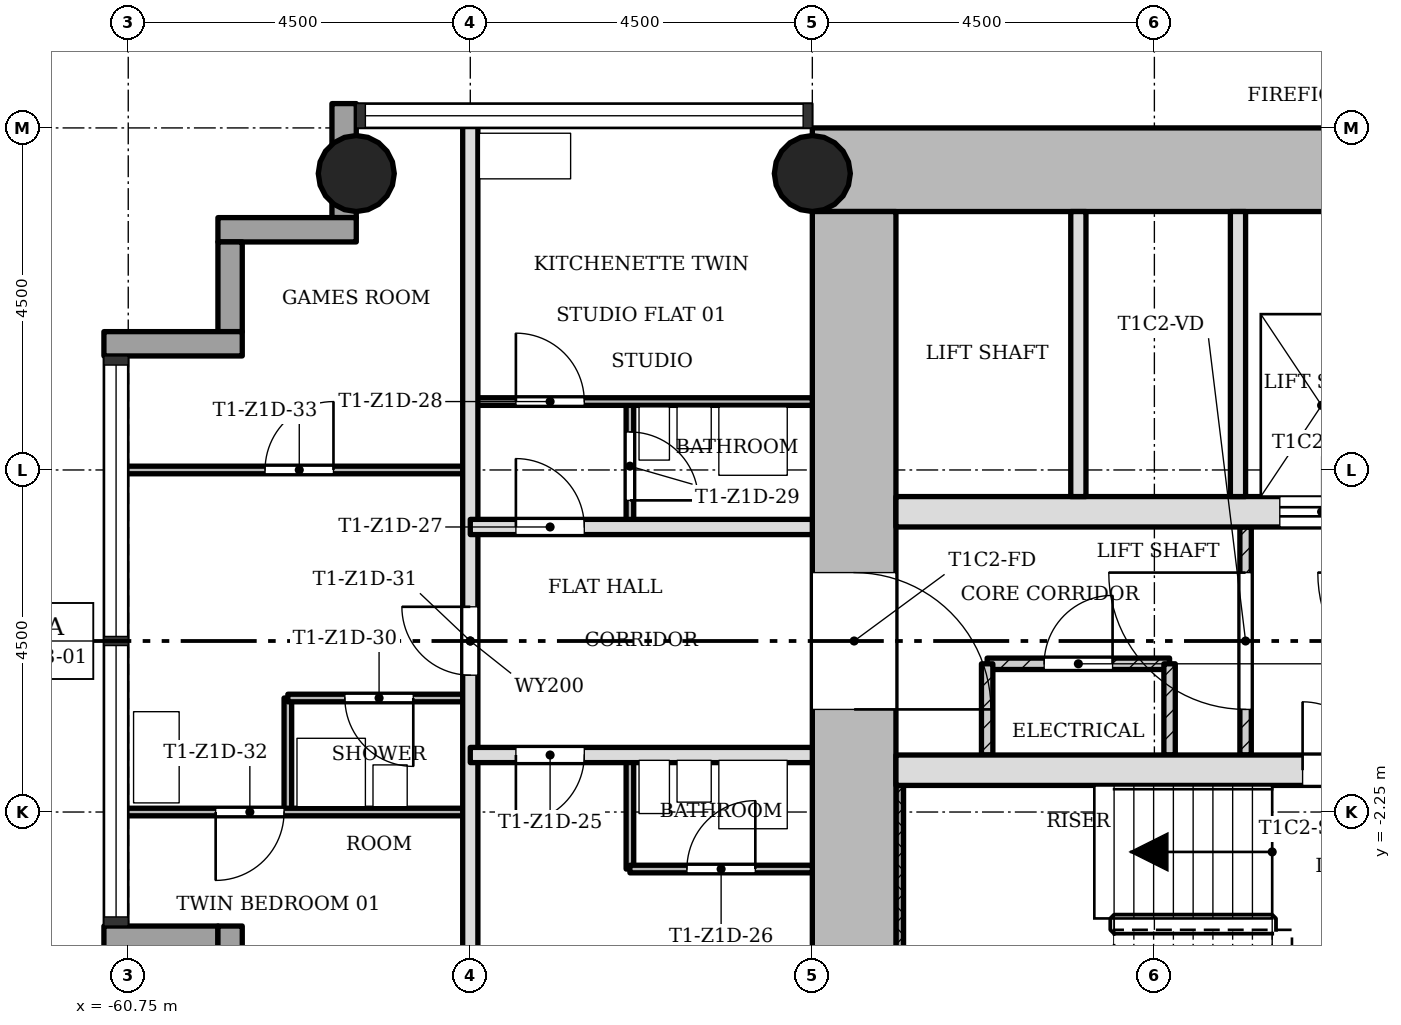
"""IFC4 building model, lengths in metres.
Left out: names, types, materials, properties, quantities, classifications, styles, units other than length and angle.
Written with IfcOpenShell. Run it as: python <this file> out.ifc"""

import sys

from ifc_helpers import new_model, si_unit, direction, frame, frame_2d, origin, origin_2d, place, context, subcontext, project, spatial, rectangle, hollow_circle, extrude, element, fill, save


model = new_model("IFC4")
c1 = context("Model", 3, precision=1e-05, world=origin(), true_north=direction((0.0, 1.0)))
c2 = subcontext(c1, "Body", "Model", "MODEL_VIEW")
j1 = project(units=[si_unit("LENGTHUNIT", "METRE"), si_unit("PLANEANGLEUNIT", "RADIAN")], contexts=[c1])
p1 = place(None, origin())
s1 = spatial("IfcSite", under=j1, at=p1, CompositionType="ELEMENT")
p2 = place(p1, origin())
s2 = spatial("IfcBuilding", under=s1, at=p2, CompositionType="ELEMENT")
p3 = place(p2, frame((0.0, 0.0, 55.1)))
s3 = spatial("IfcBuildingStorey", under=s2, at=p3, CompositionType="ELEMENT", Elevation=55.1)
p4 = place(p3, frame((-43.85, 6.2, 0.0), z_axis=(0.0, 0.0, 1.0), x_axis=(-1.0, 0.0, 0.0)))
e1 = element("IfcWall", 1, at=p4, inside=s3, PredefinedType="SHEAR", context=c2, shape_type="SweptSolid", body=[
    extrude(rectangle(XDim=7.9, YDim=1.1, at=frame_2d((3.95, 0.0))), origin(), (0.0, 0.0, 1.0), 3.4),
])
p5 = place(p3, frame((-51.2, 5.65, 0.0), z_axis=(0.0, 0.0, 1.0), x_axis=(0.0, -1.0, 0.0)))
e2 = element("IfcWall", 2, at=p5, inside=s3, PredefinedType="SHEAR", context=c2, shape_type="SweptSolid", body=[
    extrude(rectangle(XDim=12.4, YDim=1.1, at=frame_2d((6.2, 0.0))), origin(), (0.0, 0.0, 1.0), 3.4),
])
p6 = place(p5, frame((4.75, 0.0, 0.0)))
e3 = element("IfcOpeningElement", 3, at=p6, cuts=e2, PredefinedType="OPENING", context=c2, shape_type="SweptSolid", body=[
    extrude(rectangle(XDim=1.8, YDim=2.1, at=frame_2d((0.9, 1.05))), frame((0.0, 0.56, 0.0), z_axis=(0.0, -1.0, 0.0), x_axis=(1.0, 0.0, 0.0)), (0.0, 0.0, 1.0), 1.12),
])
p7 = place(p3, frame((-50.65, -1.7, 0.0), z_axis=(0.0, 0.0, 1.0), x_axis=(1.0, 0.0, 0.0)))
e4 = element("IfcWall", 4, at=p7, inside=s3, PredefinedType="SHEAR", context=c2, shape_type="SweptSolid", body=[
    extrude(rectangle(XDim=6.8, YDim=0.4, at=frame_2d((3.4, 0.0))), origin(), (0.0, 0.0, 1.0), 3.4),
])
p8 = place(p7, frame((5.35, 0.0, 0.0)))
e5 = element("IfcOpeningElement", 5, at=p8, cuts=e4, PredefinedType="OPENING", context=c2, shape_type="SweptSolid", body=[
    extrude(rectangle(XDim=0.9, YDim=2.1, at=frame_2d((0.45, 1.05))), frame((0.0, 0.21, 0.0), z_axis=(0.0, -1.0, 0.0), x_axis=(1.0, 0.0, 0.0)), (0.0, 0.0, 1.0), 0.42),
])
p9 = place(p3, frame((-50.65, 1.7, 0.0), z_axis=(0.0, 0.0, 1.0), x_axis=(1.0, 0.0, 0.0)))
e6 = element("IfcWall", 6, at=p9, inside=s3, PredefinedType="SHEAR", context=c2, shape_type="SweptSolid", body=[
    extrude(rectangle(XDim=6.8, YDim=0.4, at=frame_2d((3.4, 0.0))), origin(), (0.0, 0.0, 1.0), 3.4),
])
p10 = place(p9, frame((5.05, 0.0, 0.0)))
e7 = element("IfcOpeningElement", 7, at=p10, cuts=e6, PredefinedType="OPENING", context=c2, shape_type="SweptSolid", body=[
    extrude(rectangle(XDim=1.1, YDim=2.1, at=frame_2d((0.55, 1.05))), frame((0.0, 0.21, 0.0), z_axis=(0.0, -1.0, 0.0), x_axis=(1.0, 0.0, 0.0)), (0.0, 0.0, 1.0), 0.42),
])
for number, where, z_axis, x_axis in (
    (8, (-51.75, 6.15, 0.0), (0.0, 0.0, 1.0), (1.0, 0.0, 0.0)),
    (9, (-57.75, 6.15, 0.0), (0.0, 0.0, 1.0), (1.0, 0.0, 0.0)),
):
    element("IfcColumn", number, at=place(p3, frame(where, z_axis=z_axis, x_axis=x_axis)), inside=s3, PredefinedType="COLUMN", context=c2, shape_type="SweptSolid", body=[
        extrude(hollow_circle(Radius=0.5, WallThickness=0.036, at=origin_2d()), origin(), (0.0, 0.0, 1.0), 3.4),
    ])
p11 = place(p3, frame((-61.07, -3.91, -0.3), z_axis=(0.0, 0.0, 1.0), x_axis=(1.0, 0.0, 0.0)))
e10 = element("IfcWall", 10, at=p11, inside=s3, PredefinedType="STANDARD", context=c2, shape_type="SweptSolid", body=[
    extrude(rectangle(XDim=1.5, YDim=0.32, at=frame_2d((0.75, 0.0))), origin(), (0.0, 0.0, 1.0), 3.4),
])
p12 = place(p3, frame((-59.41, -3.75, -0.3), z_axis=(0.0, 0.0, 1.0), x_axis=(0.0, -1.0, 0.0)))
e11 = element("IfcWall", 11, at=p12, inside=s3, PredefinedType="STANDARD", context=c2, shape_type="SweptSolid", body=[
    extrude(rectangle(XDim=1.82, YDim=0.32, at=frame_2d((0.91, 0.0))), origin(), (0.0, 0.0, 1.0), 3.4),
])
p13 = place(p12, frame((0.41, 0.0, 1.2)))
e12 = element("IfcOpeningElement", 12, at=p13, cuts=e11, PredefinedType="OPENING", context=c2, shape_type="SweptSolid", body=[
    extrude(rectangle(XDim=1.0, YDim=1.5, at=frame_2d((0.5, 0.75))), frame((0.0, 0.17, 0.0), z_axis=(0.0, -1.0, 0.0), x_axis=(1.0, 0.0, 0.0)), (0.0, 0.0, 1.0), 0.34),
])
p14 = place(p3, frame((-57.91, 7.07, -0.3), z_axis=(0.0, 0.0, 1.0), x_axis=(0.0, -1.0, 0.0)))
e13 = element("IfcWall", 13, at=p14, inside=s3, PredefinedType="STANDARD", context=c2, shape_type="SweptSolid", body=[
    extrude(rectangle(XDim=1.5, YDim=0.32, at=frame_2d((0.75, 0.0))), origin(), (0.0, 0.0, 1.0), 3.4),
])
p15 = place(p3, frame((-57.75, 5.41, -0.3), z_axis=(0.0, 0.0, 1.0), x_axis=(-1.0, 0.0, 0.0)))
e14 = element("IfcWall", 14, at=p15, inside=s3, PredefinedType="STANDARD", context=c2, shape_type="SweptSolid", body=[
    extrude(rectangle(XDim=1.82, YDim=0.32, at=frame_2d((0.91, 0.0))), origin(), (0.0, 0.0, 1.0), 3.4),
])
p16 = place(p3, frame((-59.41, 5.25, -0.3), z_axis=(0.0, 0.0, 1.0), x_axis=(0.0, -1.0, 0.0)))
e15 = element("IfcWall", 15, at=p16, inside=s3, PredefinedType="STANDARD", context=c2, shape_type="SweptSolid", body=[
    extrude(rectangle(XDim=1.18, YDim=0.32, at=frame_2d((0.59, 0.0))), origin(), (0.0, 0.0, 1.0), 3.4),
])
p17 = place(p3, frame((-59.25, 3.91, -0.3), z_axis=(0.0, 0.0, 1.0), x_axis=(-1.0, 0.0, 0.0)))
e16 = element("IfcWall", 16, at=p17, inside=s3, PredefinedType="STANDARD", context=c2, shape_type="SweptSolid", body=[
    extrude(rectangle(XDim=1.82, YDim=0.32, at=frame_2d((0.91, 0.0))), origin(), (0.0, 0.0, 1.0), 3.4),
])
p18 = place(p3, frame((-46.05, 1.5, 0.0), z_axis=(0.0, 0.0, 1.0), x_axis=(0.0, -1.0, 0.0)))
e17 = element("IfcWall", 17, at=p18, inside=s3, PredefinedType="PARTITIONING", context=c2, shape_type="SweptSolid", body=[
    extrude(rectangle(XDim=3.0, YDim=0.15, at=frame_2d((1.5, 0.0))), origin(), (0.0, 0.0, 1.0), 3.0),
])
p19 = place(p18, frame((0.6, 0.0, 0.0)))
e18 = element("IfcOpeningElement", 18, at=p19, cuts=e17, PredefinedType="OPENING", context=c2, shape_type="SweptSolid", body=[
    extrude(rectangle(XDim=1.8, YDim=2.1, at=frame_2d((0.9, 1.05))), frame((0.0, 0.085, 0.0), z_axis=(0.0, -1.0, 0.0), x_axis=(1.0, 0.0, 0.0)), (0.0, 0.0, 1.0), 0.17),
])
for number, where, z_axis, x_axis in (
    (19, (-46.15, 5.65, 0.0), (0.0, 0.0, 1.0), (0.0, -1.0, 0.0)),
    (20, (-48.25, 5.65, 0.0), (0.0, 0.0, 1.0), (0.0, -1.0, 0.0)),
):
    element("IfcWall", number, at=place(p3, frame(where, z_axis=z_axis, x_axis=x_axis)), inside=s3, PredefinedType="SOLIDWALL", context=c2, shape_type="SweptSolid", body=[
        extrude(rectangle(XDim=3.75, YDim=0.2, at=frame_2d((1.875, 0.0))), origin(), (0.0, 0.0, 1.0), 3.0),
    ])
p20 = place(p3, frame((-47.05, -0.3, 0.0), z_axis=(0.0, 0.0, 1.0), x_axis=(-1.0, 0.0, 0.0)))
e21 = element("IfcWall", 21, at=p20, inside=s3, PredefinedType="PARTITIONING", context=c2, shape_type="SweptSolid", body=[
    extrude(rectangle(XDim=2.4, YDim=0.15, at=frame_2d((1.2, 0.0))), origin(), (0.0, 0.0, 1.0), 3.0),
])
p21 = place(p20, frame((0.75, 0.0, 0.0)))
e22 = element("IfcOpeningElement", 22, at=p21, cuts=e21, PredefinedType="OPENING", context=c2, shape_type="SweptSolid", body=[
    extrude(rectangle(XDim=0.9, YDim=2.1, at=frame_2d((0.45, 1.05))), frame((0.0, 0.085, 0.0), z_axis=(0.0, -1.0, 0.0), x_axis=(1.0, 0.0, 0.0)), (0.0, 0.0, 1.0), 0.17),
])
for number, where, z_axis, x_axis in (
    (23, (-47.05, -0.3, 0.0), (0.0, 0.0, 1.0), (0.0, -1.0, 0.0)),
    (24, (-49.45, -0.3, 0.0), (0.0, 0.0, 1.0), (0.0, -1.0, 0.0)),
):
    element("IfcWall", number, at=place(p3, frame(where, z_axis=z_axis, x_axis=x_axis)), inside=s3, PredefinedType="PARTITIONING", context=c2, shape_type="SweptSolid", body=[
        extrude(rectangle(XDim=1.2, YDim=0.15, at=frame_2d((0.6, 0.0))), origin(), (0.0, 0.0, 1.0), 3.0),
    ])
p22 = place(p3, frame((-58.65, -2.25, 0.0), z_axis=(0.0, 0.0, 1.0), x_axis=(0.0, 1.0, 0.0)))
e25 = element("IfcWall", 25, at=p22, inside=s3, PredefinedType="PARTITIONING", context=c2, shape_type="SweptSolid", body=[
    extrude(rectangle(XDim=1.5, YDim=0.1, at=frame_2d((0.75, 0.0))), origin(), (0.0, 0.0, 1.0), 3.0),
])
p23 = place(p3, frame((-56.25, -6.85, 0.0), z_axis=(0.0, 0.0, 1.0), x_axis=(0.0, 1.0, 0.0)))
e26 = element("IfcWall", 26, at=p23, inside=s3, PredefinedType="SOLIDWALL", context=c2, shape_type="SweptSolid", body=[
    extrude(rectangle(XDim=13.7, YDim=0.2, at=frame_2d((6.85, 0.0))), origin(), (0.0, 0.0, 1.0), 3.0),
])
p24 = place(p23, frame((6.4, 0.0, 0.0)))
e27 = element("IfcOpeningElement", 27, at=p24, cuts=e26, PredefinedType="OPENING", context=c2, shape_type="SweptSolid", body=[
    extrude(rectangle(XDim=0.9, YDim=2.1, at=frame_2d((0.45, 1.05))), frame((0.0, 0.11, 0.0), z_axis=(0.0, -1.0, 0.0), x_axis=(1.0, 0.0, 0.0)), (0.0, 0.0, 1.0), 0.22),
])
p25 = place(p3, frame((-54.15, -3.0, 0.0), z_axis=(0.0, 0.0, 1.0), x_axis=(0.0, 1.0, 0.0)))
e28 = element("IfcWall", 28, at=p25, inside=s3, PredefinedType="PARTITIONING", context=c2, shape_type="SweptSolid", body=[
    extrude(rectangle(XDim=1.5, YDim=0.1, at=frame_2d((0.75, 0.0))), origin(), (0.0, 0.0, 1.0), 3.0),
])
p26 = place(p3, frame((-54.15, 1.5, 0.0), z_axis=(0.0, 0.0, 1.0), x_axis=(0.0, 1.0, 0.0)))
e29 = element("IfcWall", 29, at=p26, inside=s3, PredefinedType="PARTITIONING", context=c2, shape_type="SweptSolid", body=[
    extrude(rectangle(XDim=1.65, YDim=0.1, at=frame_2d((0.825, 0.0))), origin(), (0.0, 0.0, 1.0), 3.0),
])
p27 = place(p26, frame((0.35, 0.0, 0.0)))
e30 = element("IfcOpeningElement", 30, at=p27, cuts=e29, PredefinedType="OPENING", context=c2, shape_type="SweptSolid", body=[
    extrude(rectangle(XDim=0.9, YDim=2.1, at=frame_2d((0.45, 1.05))), frame((0.0, 0.06, 0.0), z_axis=(0.0, -1.0, 0.0), x_axis=(1.0, 0.0, 0.0)), (0.0, 0.0, 1.0), 0.12),
])
p28 = place(p3, frame((-54.15, -3.0, 0.0), z_axis=(0.0, 0.0, 1.0), x_axis=(1.0, 0.0, 0.0)))
e31 = element("IfcWall", 31, at=p28, inside=s3, PredefinedType="PARTITIONING", context=c2, shape_type="SweptSolid", body=[
    extrude(rectangle(XDim=2.4, YDim=0.1, at=frame_2d((1.2, 0.0))), origin(), (0.0, 0.0, 1.0), 3.0),
])
p29 = place(p28, frame((0.75, 0.0, 0.0)))
e32 = element("IfcOpeningElement", 32, at=p29, cuts=e31, PredefinedType="OPENING", context=c2, shape_type="SweptSolid", body=[
    extrude(rectangle(XDim=0.9, YDim=2.1, at=frame_2d((0.45, 1.05))), frame((0.0, 0.06, 0.0), z_axis=(0.0, -1.0, 0.0), x_axis=(1.0, 0.0, 0.0)), (0.0, 0.0, 1.0), 0.12),
])
p30 = place(p3, frame((-60.85, -2.25, 0.0), z_axis=(0.0, 0.0, 1.0), x_axis=(1.0, 0.0, 0.0)))
e33 = element("IfcWall", 33, at=p30, inside=s3, PredefinedType="PARTITIONING", context=c2, shape_type="SweptSolid", body=[
    extrude(rectangle(XDim=4.6, YDim=0.1, at=frame_2d((2.3, 0.0))), origin(), (0.0, 0.0, 1.0), 3.0),
])
p31 = place(p30, frame((1.25, 0.0, 0.0)))
e34 = element("IfcOpeningElement", 34, at=p31, cuts=e33, PredefinedType="OPENING", context=c2, shape_type="SweptSolid", body=[
    extrude(rectangle(XDim=0.9, YDim=2.1, at=frame_2d((0.45, 1.05))), frame((0.0, 0.06, 0.0), z_axis=(0.0, -1.0, 0.0), x_axis=(1.0, 0.0, 0.0)), (0.0, 0.0, 1.0), 0.12),
])
p32 = place(p3, frame((-56.25, -1.5, 0.0), z_axis=(0.0, 0.0, 1.0), x_axis=(1.0, 0.0, 0.0)))
e35 = element("IfcWall", 35, at=p32, inside=s3, PredefinedType="SOLIDWALL", context=c2, shape_type="SweptSolid", body=[
    extrude(rectangle(XDim=4.5, YDim=0.2, at=frame_2d((2.25, 0.0))), origin(), (0.0, 0.0, 1.0), 3.0),
])
p33 = place(p32, frame((0.6, 0.0, 0.0)))
e36 = element("IfcOpeningElement", 36, at=p33, cuts=e35, PredefinedType="OPENING", context=c2, shape_type="SweptSolid", body=[
    extrude(rectangle(XDim=0.9, YDim=2.1, at=frame_2d((0.45, 1.05))), frame((0.0, 0.11, 0.0), z_axis=(0.0, -1.0, 0.0), x_axis=(1.0, 0.0, 0.0)), (0.0, 0.0, 1.0), 0.22),
])
p34 = place(p3, frame((-58.65, -0.75, 0.0), z_axis=(0.0, 0.0, 1.0), x_axis=(1.0, 0.0, 0.0)))
e37 = element("IfcWall", 37, at=p34, inside=s3, PredefinedType="PARTITIONING", context=c2, shape_type="SweptSolid", body=[
    extrude(rectangle(XDim=2.4, YDim=0.1, at=frame_2d((1.2, 0.0))), origin(), (0.0, 0.0, 1.0), 3.0),
])
p35 = place(p34, frame((0.75, 0.0, 0.0)))
e38 = element("IfcOpeningElement", 38, at=p35, cuts=e37, PredefinedType="OPENING", context=c2, shape_type="SweptSolid", body=[
    extrude(rectangle(XDim=0.9, YDim=2.1, at=frame_2d((0.45, 1.05))), frame((0.0, 0.06, 0.0), z_axis=(0.0, -1.0, 0.0), x_axis=(1.0, 0.0, 0.0)), (0.0, 0.0, 1.0), 0.12),
])
p36 = place(p3, frame((-56.25, 1.5, 0.0), z_axis=(0.0, 0.0, 1.0), x_axis=(1.0, 0.0, 0.0)))
e39 = element("IfcWall", 39, at=p36, inside=s3, PredefinedType="SOLIDWALL", context=c2, shape_type="SweptSolid", body=[
    extrude(rectangle(XDim=4.5, YDim=0.2, at=frame_2d((2.25, 0.0))), origin(), (0.0, 0.0, 1.0), 3.0),
])
p37 = place(p36, frame((0.6, 0.0, 0.0)))
e40 = element("IfcOpeningElement", 40, at=p37, cuts=e39, PredefinedType="OPENING", context=c2, shape_type="SweptSolid", body=[
    extrude(rectangle(XDim=0.9, YDim=2.1, at=frame_2d((0.45, 1.05))), frame((0.0, 0.11, 0.0), z_axis=(0.0, -1.0, 0.0), x_axis=(1.0, 0.0, 0.0)), (0.0, 0.0, 1.0), 0.22),
])
p38 = place(p3, frame((-60.85, 2.25, 0.0), z_axis=(0.0, 0.0, 1.0), x_axis=(1.0, 0.0, 0.0)))
e41 = element("IfcWall", 41, at=p38, inside=s3, PredefinedType="PARTITIONING", context=c2, shape_type="SweptSolid", body=[
    extrude(rectangle(XDim=4.6, YDim=0.1, at=frame_2d((2.3, 0.0))), origin(), (0.0, 0.0, 1.0), 3.0),
])
p39 = place(p38, frame((1.9, 0.0, 0.0)))
e42 = element("IfcOpeningElement", 42, at=p39, cuts=e41, PredefinedType="OPENING", context=c2, shape_type="SweptSolid", body=[
    extrude(rectangle(XDim=0.9, YDim=2.1, at=frame_2d((0.45, 1.05))), frame((0.0, 0.06, 0.0), z_axis=(0.0, -1.0, 0.0), x_axis=(1.0, 0.0, 0.0)), (0.0, 0.0, 1.0), 0.12),
])
p40 = place(p3, frame((-56.25, 3.15, 0.0), z_axis=(0.0, 0.0, 1.0), x_axis=(1.0, 0.0, 0.0)))
e43 = element("IfcWall", 43, at=p40, inside=s3, PredefinedType="PARTITIONING", context=c2, shape_type="SweptSolid", body=[
    extrude(rectangle(XDim=4.5, YDim=0.1, at=frame_2d((2.25, 0.0))), origin(), (0.0, 0.0, 1.0), 3.0),
])
p41 = place(p40, frame((0.6, 0.0, 0.0)))
e44 = element("IfcOpeningElement", 44, at=p41, cuts=e43, PredefinedType="OPENING", context=c2, shape_type="SweptSolid", body=[
    extrude(rectangle(XDim=0.9, YDim=2.1, at=frame_2d((0.45, 1.05))), frame((0.0, 0.06, 0.0), z_axis=(0.0, -1.0, 0.0), x_axis=(1.0, 0.0, 0.0)), (0.0, 0.0, 1.0), 0.12),
])
p42 = place(p3, frame((-50.6, -1.9, 0.0), z_axis=(0.0, 0.0, 1.0), x_axis=(0.0, -1.0, 0.0)))
e45 = element("IfcWall", 45, at=p42, inside=s3, PredefinedType="SHEAR", context=c2, shape_type="SweptSolid", body=[
    extrude(rectangle(XDim=3.75, YDim=0.1, at=frame_2d((1.875, 0.0))), origin(), (0.0, 0.0, 1.0), 3.4),
])
p43 = place(p19, origin())
e46 = element("IfcDoor", 46, at=p43, inside=s3, OperationType="SINGLE_SWING_LEFT", PredefinedType="DOOR", context=c2, shape_type="SweptSolid", body=[
    extrude(rectangle(XDim=1.8, YDim=2.1, at=frame_2d((0.9, 1.05))), frame((0.0, 0.025, 0.0), z_axis=(0.0, -1.0, 0.0), x_axis=(1.0, 0.0, 0.0)), (0.0, 0.0, 1.0), 0.05),
])
fill(e18, e46)
p44 = place(p21, origin())
e47 = element("IfcDoor", 47, at=p44, inside=s3, OperationType="SINGLE_SWING_LEFT", PredefinedType="DOOR", context=c2, shape_type="SweptSolid", body=[
    extrude(rectangle(XDim=0.9, YDim=2.1, at=frame_2d((0.45, 1.05))), frame((0.0, 0.025, 0.0), z_axis=(0.0, -1.0, 0.0), x_axis=(1.0, 0.0, 0.0)), (0.0, 0.0, 1.0), 0.05),
])
fill(e22, e47)
p45 = place(p33, origin())
e48 = element("IfcDoor", 48, at=p45, inside=s3, OperationType="SINGLE_SWING_LEFT", PredefinedType="DOOR", context=c2, shape_type="SweptSolid", body=[
    extrude(rectangle(XDim=0.9, YDim=2.1, at=frame_2d((0.45, 1.05))), frame((0.0, 0.025, 0.0), z_axis=(0.0, -1.0, 0.0), x_axis=(1.0, 0.0, 0.0)), (0.0, 0.0, 1.0), 0.05),
])
fill(e36, e48)
p46 = place(p29, origin())
e49 = element("IfcDoor", 49, at=p46, inside=s3, OperationType="SINGLE_SWING_LEFT", PredefinedType="DOOR", context=c2, shape_type="SweptSolid", body=[
    extrude(rectangle(XDim=0.9, YDim=2.1, at=frame_2d((0.45, 1.05))), frame((0.0, 0.025, 0.0), z_axis=(0.0, -1.0, 0.0), x_axis=(1.0, 0.0, 0.0)), (0.0, 0.0, 1.0), 0.05),
])
fill(e32, e49)
p47 = place(p37, origin())
e50 = element("IfcDoor", 50, at=p47, inside=s3, OperationType="SINGLE_SWING_RIGHT", PredefinedType="DOOR", context=c2, shape_type="SweptSolid", body=[
    extrude(rectangle(XDim=0.9, YDim=2.1, at=frame_2d((0.45, 1.05))), frame((0.0, 0.025, 0.0), z_axis=(0.0, -1.0, 0.0), x_axis=(1.0, 0.0, 0.0)), (0.0, 0.0, 1.0), 0.05),
])
fill(e40, e50)
p48 = place(p41, origin())
e51 = element("IfcDoor", 51, at=p48, inside=s3, OperationType="SINGLE_SWING_RIGHT", PredefinedType="DOOR", context=c2, shape_type="SweptSolid", body=[
    extrude(rectangle(XDim=0.9, YDim=2.1, at=frame_2d((0.45, 1.05))), frame((0.0, 0.025, 0.0), z_axis=(0.0, -1.0, 0.0), x_axis=(1.0, 0.0, 0.0)), (0.0, 0.0, 1.0), 0.05),
])
fill(e44, e51)
p49 = place(p27, origin())
e52 = element("IfcDoor", 52, at=p49, inside=s3, OperationType="SINGLE_SWING_LEFT", PredefinedType="DOOR", context=c2, shape_type="SweptSolid", body=[
    extrude(rectangle(XDim=0.9, YDim=2.1, at=frame_2d((0.45, 1.05))), frame((0.0, 0.025, 0.0), z_axis=(0.0, -1.0, 0.0), x_axis=(1.0, 0.0, 0.0)), (0.0, 0.0, 1.0), 0.05),
])
fill(e30, e52)
p50 = place(p35, origin())
e53 = element("IfcDoor", 53, at=p50, inside=s3, OperationType="SINGLE_SWING_RIGHT", PredefinedType="DOOR", context=c2, shape_type="SweptSolid", body=[
    extrude(rectangle(XDim=0.9, YDim=2.1, at=frame_2d((0.45, 1.05))), frame((0.0, 0.025, 0.0), z_axis=(0.0, -1.0, 0.0), x_axis=(1.0, 0.0, 0.0)), (0.0, 0.0, 1.0), 0.05),
])
fill(e38, e53)
p51 = place(p24, origin())
e54 = element("IfcDoor", 54, at=p51, inside=s3, OperationType="SINGLE_SWING_LEFT", PredefinedType="DOOR", context=c2, shape_type="SweptSolid", body=[
    extrude(rectangle(XDim=0.9, YDim=2.1, at=frame_2d((0.45, 1.05))), frame((0.0, 0.025, 0.0), z_axis=(0.0, -1.0, 0.0), x_axis=(1.0, 0.0, 0.0)), (0.0, 0.0, 1.0), 0.05),
])
fill(e27, e54)
p52 = place(p31, origin())
e55 = element("IfcDoor", 55, at=p52, inside=s3, OperationType="SINGLE_SWING_LEFT", PredefinedType="DOOR", context=c2, shape_type="SweptSolid", body=[
    extrude(rectangle(XDim=0.9, YDim=2.1, at=frame_2d((0.45, 1.05))), frame((0.0, 0.025, 0.0), z_axis=(0.0, -1.0, 0.0), x_axis=(1.0, 0.0, 0.0)), (0.0, 0.0, 1.0), 0.05),
])
fill(e34, e55)
p53 = place(p39, origin())
e56 = element("IfcDoor", 56, at=p53, inside=s3, OperationType="SINGLE_SWING_LEFT", PredefinedType="DOOR", context=c2, shape_type="SweptSolid", body=[
    extrude(rectangle(XDim=0.9, YDim=2.1, at=frame_2d((0.45, 1.05))), frame((0.0, 0.025, 0.0), z_axis=(0.0, -1.0, 0.0), x_axis=(1.0, 0.0, 0.0)), (0.0, 0.0, 1.0), 0.05),
])
fill(e42, e56)
p54 = place(p8, origin())
e57 = element("IfcDoor", 57, at=p54, inside=s3, OperationType="SINGLE_SWING_RIGHT", PredefinedType="DOOR", context=c2, shape_type="SweptSolid", body=[
    extrude(rectangle(XDim=0.9, YDim=2.1, at=frame_2d((0.45, 1.05))), frame((0.0, 0.025, 0.0), z_axis=(0.0, -1.0, 0.0), x_axis=(1.0, 0.0, 0.0)), (0.0, 0.0, 1.0), 0.05),
])
fill(e5, e57)
p55 = place(p10, origin())
e58 = element("IfcDoor", 58, at=p55, inside=s3, OperationType="SLIDING_TO_LEFT", PredefinedType="DOOR", context=c2, shape_type="SweptSolid", body=[
    extrude(rectangle(XDim=1.1, YDim=2.1, at=frame_2d((0.55, 1.05))), frame((0.0, 0.025, 0.0), z_axis=(0.0, -1.0, 0.0), x_axis=(1.0, 0.0, 0.0)), (0.0, 0.0, 1.0), 0.05),
])
fill(e7, e58)
p56 = place(p6, origin())
e59 = element("IfcDoor", 59, at=p56, inside=s3, OperationType="SINGLE_SWING_LEFT", PredefinedType="DOOR", context=c2, shape_type="SweptSolid", body=[
    extrude(rectangle(XDim=1.8, YDim=2.1, at=frame_2d((0.9, 1.05))), frame((0.0, 0.025, 0.0), z_axis=(0.0, -1.0, 0.0), x_axis=(1.0, 0.0, 0.0)), (0.0, 0.0, 1.0), 0.05),
])
fill(e3, e59)
save(model, sys.argv[1])
